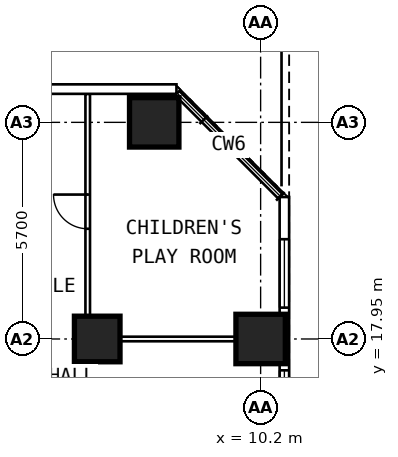
"""IFC4 building model, lengths in metres.
Left out: names, types, materials, properties, quantities, classifications, styles, units other than length and angle.
Written with IfcOpenShell. Run it as: python <this file> out.ifc"""

import sys

from ifc_helpers import new_model, si_unit, direction, frame, frame_2d, origin, origin_2d, place, context, subcontext, project, spatial, rectangle, extrude, element, fill, save


model = new_model("IFC4")
c1 = context("Model", 3, precision=1e-05, world=origin(), true_north=direction((0.0, 1.0)))
c2 = subcontext(c1, "Body", "Model", "MODEL_VIEW")
j1 = project(units=[si_unit("LENGTHUNIT", "METRE"), si_unit("PLANEANGLEUNIT", "RADIAN")], contexts=[c1])
p1 = place(None, origin())
s1 = spatial("IfcSite", under=j1, at=p1, CompositionType="ELEMENT")
p2 = place(p1, origin())
s2 = spatial("IfcBuilding", under=s1, at=p2, CompositionType="ELEMENT")
p3 = place(p2, frame((0.0, 0.0, 120.2)))
s3 = spatial("IfcBuildingStorey", under=s2, at=p3, CompositionType="ELEMENT", Elevation=120.2)
for number, where, z_axis, x_axis in (
    (1, (10.2, 17.95, 0.0), (0.0, 0.0, 1.0), (0.0, 1.0, 0.0)),
    (2, (7.4, 23.65, 0.0), (0.0, 0.0, 1.0), (0.0, 1.0, 0.0)),
):
    element("IfcColumn", number, at=place(p3, frame(where, z_axis=z_axis, x_axis=x_axis)), inside=s3, PredefinedType="COLUMN", context=c2, shape_type="SweptSolid", body=[
        extrude(rectangle(XDim=1.3, YDim=1.3, at=origin_2d()), origin(), (0.0, 0.0, 1.0), 3.6),
    ])
p4 = place(p3, frame((5.9, 17.95, 0.0), z_axis=(0.0, 0.0, 1.0), x_axis=(0.0, 1.0, 0.0)))
e3 = element("IfcColumn", 3, at=p4, inside=s3, PredefinedType="COLUMN", context=c2, shape_type="SweptSolid", body=[
    extrude(rectangle(XDim=1.2, YDim=1.2, at=origin_2d()), origin(), (0.0, 0.0, 1.0), 3.6),
])
p5 = place(p3, frame((10.825, 6.409, 0.0), z_axis=(0.0, 0.0, 1.0), x_axis=(0.0, 1.0, 0.0)))
e4 = element("IfcWall", 4, at=p5, inside=s3, PredefinedType="SOLIDWALL", context=c2, shape_type="SweptSolid", body=[
    extrude(rectangle(XDim=15.276, YDim=0.25, at=frame_2d((7.638, 0.0))), origin(), (0.0, 0.0, 1.0), 3.35),
])
p6 = place(p5, frame((0.966, 0.0, 0.8)))
e5 = element("IfcOpeningElement", 5, at=p6, cuts=e4, PredefinedType="OPENING", context=c2, shape_type="SweptSolid", body=[
    extrude(rectangle(XDim=1.8, YDim=1.8, at=frame_2d((0.9, 0.9))), frame((0.0, 0.137, 0.0), z_axis=(0.0, -1.0, 0.0), x_axis=(1.0, 0.0, 0.0)), (0.0, 0.0, 1.0), 0.274),
])
p7 = place(p5, frame((3.216, 0.0, 0.8)))
e6 = element("IfcOpeningElement", 6, at=p7, cuts=e4, PredefinedType="OPENING", context=c2, shape_type="SweptSolid", body=[
    extrude(rectangle(XDim=1.8, YDim=1.8, at=frame_2d((0.9, 0.9))), frame((0.0, 0.137, 0.0), z_axis=(0.0, -1.0, 0.0), x_axis=(1.0, 0.0, 0.0)), (0.0, 0.0, 1.0), 0.274),
])
p8 = place(p5, frame((6.666, 0.0, 0.8)))
e7 = element("IfcOpeningElement", 7, at=p8, cuts=e4, PredefinedType="OPENING", context=c2, shape_type="SweptSolid", body=[
    extrude(rectangle(XDim=1.8, YDim=1.8, at=frame_2d((0.9, 0.9))), frame((0.0, 0.137, 0.0), z_axis=(0.0, -1.0, 0.0), x_axis=(1.0, 0.0, 0.0)), (0.0, 0.0, 1.0), 0.274),
])
p9 = place(p5, frame((8.916, 0.0, 0.8)))
e8 = element("IfcOpeningElement", 8, at=p9, cuts=e4, PredefinedType="OPENING", context=c2, shape_type="SweptSolid", body=[
    extrude(rectangle(XDim=1.8, YDim=1.8, at=frame_2d((0.9, 0.9))), frame((0.0, 0.137, 0.0), z_axis=(0.0, -1.0, 0.0), x_axis=(1.0, 0.0, 0.0)), (0.0, 0.0, 1.0), 0.274),
])
p10 = place(p5, frame((12.366, 0.0, 0.8)))
e9 = element("IfcOpeningElement", 9, at=p10, cuts=e4, PredefinedType="OPENING", context=c2, shape_type="SweptSolid", body=[
    extrude(rectangle(XDim=1.8, YDim=1.8, at=frame_2d((0.9, 0.9))), frame((0.0, 0.137, 0.0), z_axis=(0.0, -1.0, 0.0), x_axis=(1.0, 0.0, 0.0)), (0.0, 0.0, 1.0), 0.274),
])
p11 = place(p3, frame((7.985, 24.525, 0.0), z_axis=(0.0, 0.0, 1.0), x_axis=(-1.0, 0.0, 0.0)))
e10 = element("IfcWall", 10, at=p11, inside=s3, PredefinedType="SOLIDWALL", context=c2, shape_type="SweptSolid", body=[
    extrude(rectangle(XDim=15.971, YDim=0.25, at=frame_2d((7.985, 0.0))), origin(), (0.0, 0.0, 1.0), 3.35),
])
p12 = place(p11, frame((7.485, 0.0, 0.0)))
e11 = element("IfcOpeningElement", 11, at=p12, cuts=e10, PredefinedType="OPENING", context=c2, shape_type="SweptSolid", body=[
    extrude(rectangle(XDim=1.0, YDim=2.4, at=frame_2d((0.5, 1.2))), frame((0.0, 0.137, 0.0), z_axis=(0.0, -1.0, 0.0), x_axis=(1.0, 0.0, 0.0)), (0.0, 0.0, 1.0), 0.274),
])
p13 = place(p11, frame((3.485, 0.0, 0.8)))
e12 = element("IfcOpeningElement", 12, at=p13, cuts=e10, PredefinedType="OPENING", context=c2, shape_type="SweptSolid", body=[
    extrude(rectangle(XDim=1.8, YDim=1.8, at=frame_2d((0.9, 0.9))), frame((0.0, 0.137, 0.0), z_axis=(0.0, -1.0, 0.0), x_axis=(1.0, 0.0, 0.0)), (0.0, 0.0, 1.0), 0.274),
])
p14 = place(p11, frame((10.685, 0.0, 0.8)))
e13 = element("IfcOpeningElement", 13, at=p14, cuts=e10, PredefinedType="OPENING", context=c2, shape_type="SweptSolid", body=[
    extrude(rectangle(XDim=1.8, YDim=1.8, at=frame_2d((0.9, 0.9))), frame((0.0, 0.137, 0.0), z_axis=(0.0, -1.0, 0.0), x_axis=(1.0, 0.0, 0.0)), (0.0, 0.0, 1.0), 0.274),
])
p15 = place(p3, frame((5.65, 9.6, 0.0), z_axis=(0.0, 0.0, 1.0), x_axis=(0.0, 1.0, 0.0)))
e14 = element("IfcWall", 14, at=p15, inside=s3, PredefinedType="PARTITIONING", context=c2, shape_type="SweptSolid", body=[
    extrude(rectangle(XDim=14.8, YDim=0.12, at=frame_2d((7.4, 0.0))), origin(), (0.0, 0.0, 1.0), 3.35),
])
p16 = place(p15, frame((3.925, 0.0, 0.0)))
e15 = element("IfcOpeningElement", 15, at=p16, cuts=e14, PredefinedType="OPENING", context=c2, shape_type="SweptSolid", body=[
    extrude(rectangle(XDim=0.9, YDim=2.1, at=frame_2d((0.45, 1.05))), frame((0.0, 0.072, 0.0), z_axis=(0.0, -1.0, 0.0), x_axis=(1.0, 0.0, 0.0)), (0.0, 0.0, 1.0), 0.144),
])
p17 = place(p15, frame((11.25, 0.0, 0.0)))
e16 = element("IfcOpeningElement", 16, at=p17, cuts=e14, PredefinedType="OPENING", context=c2, shape_type="SweptSolid", body=[
    extrude(rectangle(XDim=0.9, YDim=2.1, at=frame_2d((0.45, 1.05))), frame((0.0, 0.072, 0.0), z_axis=(0.0, -1.0, 0.0), x_axis=(1.0, 0.0, 0.0)), (0.0, 0.0, 1.0), 0.144),
])
p18 = place(p3, frame((5.71, 17.95, 0.0), z_axis=(0.0, 0.0, 1.0), x_axis=(1.0, 0.0, 0.0)))
e17 = element("IfcWall", 17, at=p18, inside=s3, PredefinedType="PARTITIONING", context=c2, shape_type="SweptSolid", body=[
    extrude(rectangle(XDim=4.99, YDim=0.12, at=frame_2d((2.495, 0.0))), origin(), (0.0, 0.0, 1.0), 2.45),
])
p19 = place(p9, origin())
e18 = element("IfcWindow", 18, at=p19, inside=s3, PartitioningType="SINGLE_PANEL", PredefinedType="WINDOW", context=c2, shape_type="SweptSolid", body=[
    extrude(rectangle(XDim=1.8, YDim=1.8, at=frame_2d((0.9, 0.9))), frame((0.0, 0.03, 0.0), z_axis=(0.0, -1.0, 0.0), x_axis=(1.0, 0.0, 0.0)), (0.0, 0.0, 1.0), 0.06),
])
fill(e8, e18)
p20 = place(p10, origin())
e19 = element("IfcWindow", 19, at=p20, inside=s3, PartitioningType="SINGLE_PANEL", PredefinedType="WINDOW", context=c2, shape_type="SweptSolid", body=[
    extrude(rectangle(XDim=1.8, YDim=1.8, at=frame_2d((0.9, 0.9))), frame((0.0, 0.03, 0.0), z_axis=(0.0, -1.0, 0.0), x_axis=(1.0, 0.0, 0.0)), (0.0, 0.0, 1.0), 0.06),
])
fill(e9, e19)
p21 = place(p17, origin())
e20 = element("IfcDoor", 20, at=p21, inside=s3, OperationType="SINGLE_SWING_RIGHT", PredefinedType="DOOR", context=c2, shape_type="SweptSolid", body=[
    extrude(rectangle(XDim=0.9, YDim=2.1, at=frame_2d((0.45, 1.05))), frame((0.0, 0.025, 0.0), z_axis=(0.0, -1.0, 0.0), x_axis=(1.0, 0.0, 0.0)), (0.0, 0.0, 1.0), 0.05),
])
fill(e16, e20)
save(model, sys.argv[1])
